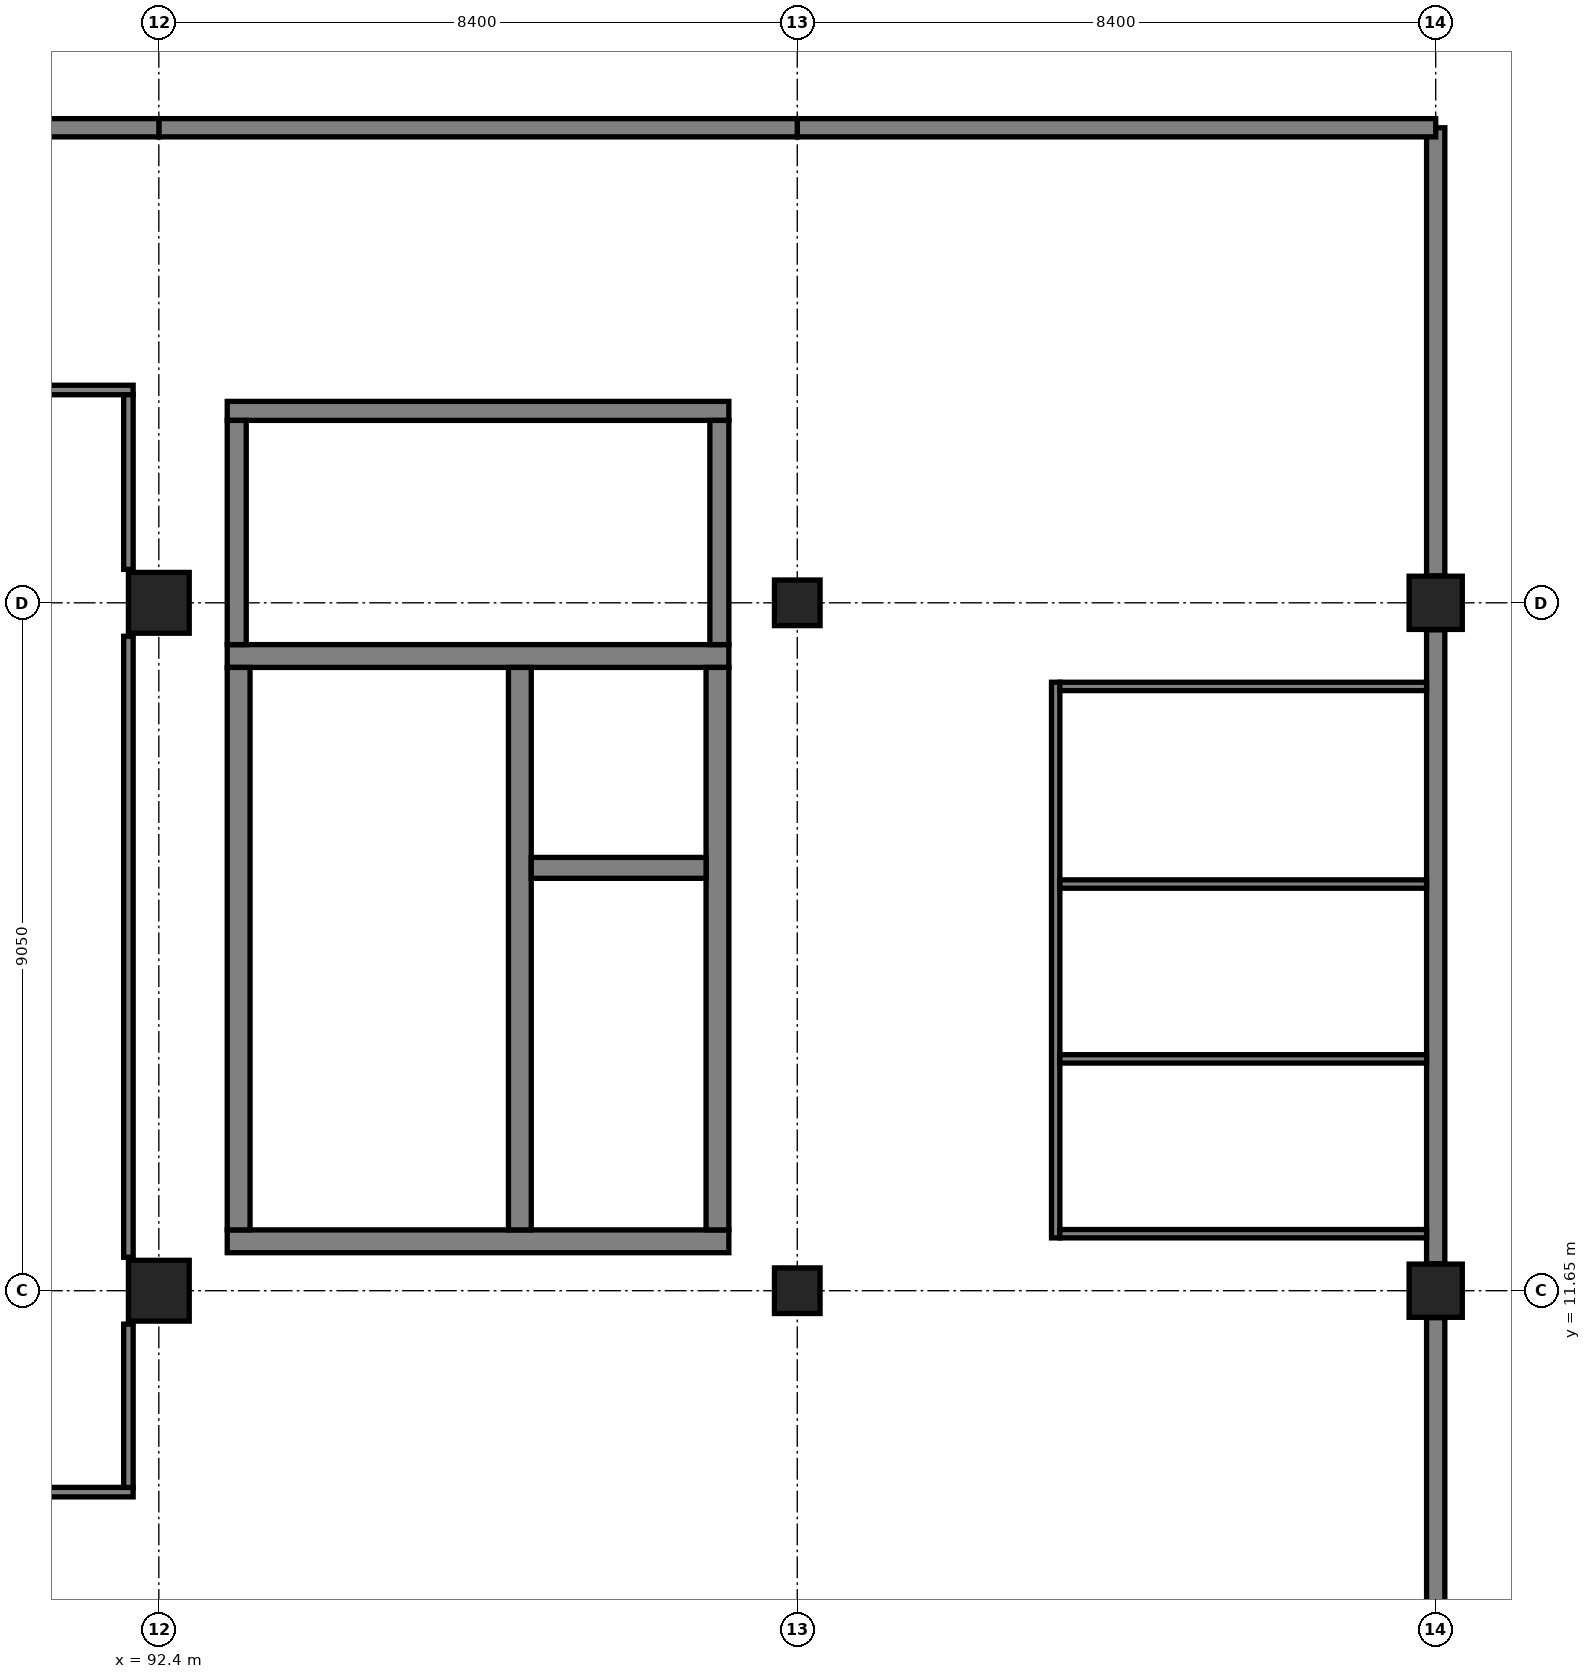
"""IFC4 building model, lengths in metres.
Left out: names, types, materials, properties, quantities, classifications, styles, units other than length and angle.
Written with IfcOpenShell. Run it as: python <this file> out.ifc"""

import sys

from ifc_helpers import new_model, si_unit, direction, frame, frame_2d, origin, origin_2d, place, context, subcontext, project, spatial, rectangle, extrude, element, fill, save


model = new_model("IFC4")
c1 = context("Model", 3, precision=1e-05, world=origin(), true_north=direction((0.0, 1.0)))
c2 = subcontext(c1, "Body", "Model", "MODEL_VIEW")
j1 = project(units=[si_unit("LENGTHUNIT", "METRE"), si_unit("PLANEANGLEUNIT", "RADIAN")], contexts=[c1])
p1 = place(None, origin())
s1 = spatial("IfcSite", under=j1, at=p1, CompositionType="ELEMENT")
p2 = place(p1, origin())
s2 = spatial("IfcBuilding", under=s1, at=p2, CompositionType="ELEMENT")
p3 = place(p2, frame((0.0, 0.0, 15.6)))
s3 = spatial("IfcBuildingStorey", under=s2, at=p3, CompositionType="ELEMENT", Elevation=15.6)
for number, where, z_axis, x_axis in (
    (1, (92.4, 11.65, 0.0), (0.0, 0.0, 1.0), (1.0, 0.0, 0.0)),
    (2, (92.4, 20.7, 0.0), (0.0, 0.0, 1.0), (1.0, 0.0, 0.0)),
):
    element("IfcColumn", number, at=place(p3, frame(where, z_axis=z_axis, x_axis=x_axis)), inside=s3, PredefinedType="COLUMN", context=c2, shape_type="SweptSolid", body=[
        extrude(rectangle(XDim=0.8, YDim=0.8, at=origin_2d()), origin(), (0.0, 0.0, 1.0), 4.5),
    ])
for number, where, z_axis, x_axis in (
    (3, (100.8, 11.65, 0.0), (0.0, 0.0, 1.0), (1.0, 0.0, 0.0)),
    (4, (100.8, 20.7, 0.0), (0.0, 0.0, 1.0), (1.0, 0.0, 0.0)),
):
    element("IfcColumn", number, at=place(p3, frame(where, z_axis=z_axis, x_axis=x_axis)), inside=s3, PredefinedType="COLUMN", context=c2, shape_type="SweptSolid", body=[
        extrude(rectangle(XDim=0.6, YDim=0.6, at=origin_2d()), origin(), (0.0, 0.0, 1.0), 4.5),
    ])
for number, where, z_axis, x_axis in (
    (5, (109.2, 11.65, 0.0), (0.0, 0.0, 1.0), (1.0, 0.0, 0.0)),
    (6, (109.2, 20.7, 0.0), (0.0, 0.0, 1.0), (1.0, 0.0, 0.0)),
):
    element("IfcColumn", number, at=place(p3, frame(where, z_axis=z_axis, x_axis=x_axis)), inside=s3, PredefinedType="COLUMN", context=c2, shape_type="SweptSolid", body=[
        extrude(rectangle(XDim=0.7, YDim=0.7, at=origin_2d()), origin(), (0.0, 0.0, 1.0), 4.5),
    ])
p4 = place(p3, frame((109.2, 2.905, 0.0), z_axis=(0.0, 0.0, 1.0), x_axis=(0.0, 1.0, 0.0)))
e7 = element("IfcWall", 7, at=p4, inside=s3, PredefinedType="STANDARD", context=c2, shape_type="SweptSolid", body=[
    extrude(rectangle(XDim=8.39, YDim=0.24, at=frame_2d((4.195, 0.0))), origin(), (0.0, 0.0, 1.0), 3.35),
])
p5 = place(p4, frame((3.355, 0.0, 0.95)))
e8 = element("IfcOpeningElement", 8, at=p5, cuts=e7, PredefinedType="OPENING", context=c2, shape_type="SweptSolid", body=[
    extrude(rectangle(XDim=1.68, YDim=2.08, at=frame_2d((0.84, 1.04))), frame((0.0, 0.13, 0.0), z_axis=(0.0, -1.0, 0.0), x_axis=(1.0, 0.0, 0.0)), (0.0, 0.0, 1.0), 0.26),
])
p6 = place(p3, frame((109.2, 12.005, 0.0), z_axis=(0.0, 0.0, 1.0), x_axis=(0.0, 1.0, 0.0)))
e9 = element("IfcWall", 9, at=p6, inside=s3, PredefinedType="STANDARD", context=c2, shape_type="SweptSolid", body=[
    extrude(rectangle(XDim=8.34, YDim=0.24, at=frame_2d((4.17, 0.0))), origin(), (0.0, 0.0, 1.0), 3.35),
])
p7 = place(p3, frame((109.2, 21.055, 0.0), z_axis=(0.0, 0.0, 1.0), x_axis=(0.0, 1.0, 0.0)))
e10 = element("IfcWall", 10, at=p7, inside=s3, PredefinedType="STANDARD", context=c2, shape_type="SweptSolid", body=[
    extrude(rectangle(XDim=5.895, YDim=0.24, at=frame_2d((2.948, 0.0))), origin(), (0.0, 0.0, 1.0), 4.2),
])
p8 = place(p7, frame((1.717, 0.0, 0.95)))
e11 = element("IfcOpeningElement", 11, at=p8, cuts=e10, PredefinedType="OPENING", context=c2, shape_type="SweptSolid", body=[
    extrude(rectangle(XDim=2.46, YDim=2.14, at=frame_2d((1.23, 1.07))), frame((0.0, 0.13, 0.0), z_axis=(0.0, -1.0, 0.0), x_axis=(1.0, 0.0, 0.0)), (0.0, 0.0, 1.0), 0.26),
])
p9 = place(p3, frame((109.2, 26.95, 0.0), z_axis=(0.0, 0.0, 1.0), x_axis=(-1.0, 0.0, 0.0)))
e12 = element("IfcWall", 12, at=p9, inside=s3, PredefinedType="STANDARD", context=c2, shape_type="SweptSolid", body=[
    extrude(rectangle(XDim=8.4, YDim=0.24, at=frame_2d((4.2, 0.0))), origin(), (0.0, 0.0, 1.0), 4.2),
])
p10 = place(p9, frame((3.07, 0.0, 0.95)))
e13 = element("IfcOpeningElement", 13, at=p10, cuts=e12, PredefinedType="OPENING", context=c2, shape_type="SweptSolid", body=[
    extrude(rectangle(XDim=2.26, YDim=2.02, at=frame_2d((1.13, 1.01))), frame((0.0, 0.13, 0.0), z_axis=(0.0, -1.0, 0.0), x_axis=(1.0, 0.0, 0.0)), (0.0, 0.0, 1.0), 0.26),
])
p11 = place(p3, frame((100.8, 26.95, 0.0), z_axis=(0.0, 0.0, 1.0), x_axis=(-1.0, 0.0, 0.0)))
e14 = element("IfcWall", 14, at=p11, inside=s3, PredefinedType="STANDARD", context=c2, shape_type="SweptSolid", body=[
    extrude(rectangle(XDim=8.4, YDim=0.24, at=frame_2d((4.2, 0.0))), origin(), (0.0, 0.0, 1.0), 4.2),
])
p12 = place(p11, frame((3.4, 0.0, 0.0)))
e15 = element("IfcOpeningElement", 15, at=p12, cuts=e14, PredefinedType="OPENING", context=c2, shape_type="SweptSolid", body=[
    extrude(rectangle(XDim=1.6, YDim=2.25, at=frame_2d((0.8, 1.125))), frame((0.0, 0.13, 0.0), z_axis=(0.0, -1.0, 0.0), x_axis=(1.0, 0.0, 0.0)), (0.0, 0.0, 1.0), 0.26),
])
p13 = place(p3, frame((92.4, 26.95, 0.0), z_axis=(0.0, 0.0, 1.0), x_axis=(-1.0, 0.0, 0.0)))
e16 = element("IfcWall", 16, at=p13, inside=s3, PredefinedType="STANDARD", context=c2, shape_type="SweptSolid", body=[
    extrude(rectangle(XDim=8.4, YDim=0.24, at=frame_2d((4.2, 0.0))), origin(), (0.0, 0.0, 1.0), 4.2),
])
p14 = place(p13, frame((3.4, 0.0, 0.0)))
e17 = element("IfcOpeningElement", 17, at=p14, cuts=e16, PredefinedType="OPENING", context=c2, shape_type="SweptSolid", body=[
    extrude(rectangle(XDim=1.6, YDim=2.25, at=frame_2d((0.8, 1.125))), frame((0.0, 0.13, 0.0), z_axis=(0.0, -1.0, 0.0), x_axis=(1.0, 0.0, 0.0)), (0.0, 0.0, 1.0), 0.26),
])
p15 = place(p3, frame((93.3, 12.3, 0.0), z_axis=(0.0, 0.0, 1.0), x_axis=(1.0, 0.0, 0.0)))
e18 = element("IfcWall", 18, at=p15, inside=s3, PredefinedType="SHEAR", context=c2, shape_type="SweptSolid", body=[
    extrude(rectangle(XDim=6.6, YDim=0.3, at=frame_2d((3.3, 0.0))), origin(), (0.0, 0.0, 1.0), 4.2),
])
p16 = place(p3, frame((93.3, 20.0, 0.0), z_axis=(0.0, 0.0, 1.0), x_axis=(1.0, 0.0, 0.0)))
e19 = element("IfcWall", 19, at=p16, inside=s3, PredefinedType="SHEAR", context=c2, shape_type="SweptSolid", body=[
    extrude(rectangle(XDim=6.6, YDim=0.3, at=frame_2d((3.3, 0.0))), origin(), (0.0, 0.0, 1.0), 4.2),
])
p17 = place(p16, frame((1.425, 0.0, 0.0)))
e20 = element("IfcOpeningElement", 20, at=p17, cuts=e19, PredefinedType="OPENING", context=c2, shape_type="SweptSolid", body=[
    extrude(rectangle(XDim=1.15, YDim=2.2, at=frame_2d((0.575, 1.1))), frame((0.0, 0.16, 0.0), z_axis=(0.0, -1.0, 0.0), x_axis=(1.0, 0.0, 0.0)), (0.0, 0.0, 1.0), 0.32),
])
p18 = place(p16, frame((4.55, 0.0, 0.0)))
e21 = element("IfcOpeningElement", 21, at=p18, cuts=e19, PredefinedType="OPENING", context=c2, shape_type="SweptSolid", body=[
    extrude(rectangle(XDim=1.2, YDim=2.15, at=frame_2d((0.6, 1.075))), frame((0.0, 0.16, 0.0), z_axis=(0.0, -1.0, 0.0), x_axis=(1.0, 0.0, 0.0)), (0.0, 0.0, 1.0), 0.32),
])
for number, where, z_axis, x_axis in (
    (22, (93.45, 12.45, 0.0), (0.0, 0.0, 1.0), (0.0, 1.0, 0.0)),
    (23, (99.75, 12.45, 0.0), (0.0, 0.0, 1.0), (0.0, 1.0, 0.0)),
    (24, (97.15, 12.45, 0.0), (0.0, 0.0, 1.0), (0.0, 1.0, 0.0)),
):
    element("IfcWall", number, at=place(p3, frame(where, z_axis=z_axis, x_axis=x_axis)), inside=s3, PredefinedType="SHEAR", context=c2, shape_type="SweptSolid", body=[
        extrude(rectangle(XDim=7.4, YDim=0.3, at=frame_2d((3.7, 0.0))), origin(), (0.0, 0.0, 1.0), 4.2),
    ])
p19 = place(p3, frame((97.3, 17.213, 0.0), z_axis=(0.0, 0.0, 1.0), x_axis=(1.0, 0.0, 0.0)))
e25 = element("IfcWall", 25, at=p19, inside=s3, PredefinedType="SHEAR", context=c2, shape_type="SweptSolid", body=[
    extrude(rectangle(XDim=2.3, YDim=0.275, at=frame_2d((1.15, 0.0))), origin(), (0.0, 0.0, 1.0), 4.2),
])
p20 = place(p3, frame((93.3, 23.225, 0.0), z_axis=(0.0, 0.0, 1.0), x_axis=(1.0, 0.0, 0.0)))
e26 = element("IfcWall", 26, at=p20, inside=s3, PredefinedType="PARTITIONING", context=c2, shape_type="SweptSolid", body=[
    extrude(rectangle(XDim=6.6, YDim=0.25, at=frame_2d((3.3, 0.0))), origin(), (0.0, 0.0, 1.0), 4.2),
])
p21 = place(p20, frame((2.4, 0.0, 0.0)))
e27 = element("IfcOpeningElement", 27, at=p21, cuts=e26, PredefinedType="OPENING", context=c2, shape_type="SweptSolid", body=[
    extrude(rectangle(XDim=1.8, YDim=2.25, at=frame_2d((0.9, 1.125))), frame((0.0, 0.135, 0.0), z_axis=(0.0, -1.0, 0.0), x_axis=(1.0, 0.0, 0.0)), (0.0, 0.0, 1.0), 0.27),
])
for number, where, z_axis, x_axis in (
    (28, (93.425, 20.15, 0.0), (0.0, 0.0, 1.0), (0.0, 1.0, 0.0)),
    (29, (99.775, 20.15, 0.0), (0.0, 0.0, 1.0), (0.0, 1.0, 0.0)),
):
    element("IfcWall", number, at=place(p3, frame(where, z_axis=z_axis, x_axis=x_axis)), inside=s3, PredefinedType="PARTITIONING", context=c2, shape_type="SweptSolid", body=[
        extrude(rectangle(XDim=2.95, YDim=0.25, at=frame_2d((1.475, 0.0))), origin(), (0.0, 0.0, 1.0), 3.43),
    ])
p22 = place(p3, frame((104.2, 12.345, 0.0), z_axis=(0.0, 0.0, 1.0), x_axis=(0.0, 1.0, 0.0)))
e30 = element("IfcWall", 30, at=p22, inside=s3, PredefinedType="PARTITIONING", context=c2, shape_type="SweptSolid", body=[
    extrude(rectangle(XDim=7.31, YDim=0.11, at=frame_2d((3.655, 0.0))), origin(), (0.0, 0.0, 1.0), 3.35),
])
p23 = place(p22, frame((0.745, 0.0, 0.0)))
e31 = element("IfcOpeningElement", 31, at=p23, cuts=e30, PredefinedType="OPENING", context=c2, shape_type="SweptSolid", body=[
    extrude(rectangle(XDim=0.92, YDim=2.1, at=frame_2d((0.46, 1.05))), frame((0.0, 0.065, 0.0), z_axis=(0.0, -1.0, 0.0), x_axis=(1.0, 0.0, 0.0)), (0.0, 0.0, 1.0), 0.13),
])
p24 = place(p22, frame((3.045, 0.0, 0.0)))
e32 = element("IfcOpeningElement", 32, at=p24, cuts=e30, PredefinedType="OPENING", context=c2, shape_type="SweptSolid", body=[
    extrude(rectangle(XDim=0.92, YDim=2.1, at=frame_2d((0.46, 1.05))), frame((0.0, 0.065, 0.0), z_axis=(0.0, -1.0, 0.0), x_axis=(1.0, 0.0, 0.0)), (0.0, 0.0, 1.0), 0.13),
])
p25 = place(p22, frame((5.455, 0.0, 0.0)))
e33 = element("IfcOpeningElement", 33, at=p25, cuts=e30, PredefinedType="OPENING", context=c2, shape_type="SweptSolid", body=[
    extrude(rectangle(XDim=1.0, YDim=2.15, at=frame_2d((0.5, 1.075))), frame((0.0, 0.065, 0.0), z_axis=(0.0, -1.0, 0.0), x_axis=(1.0, 0.0, 0.0)), (0.0, 0.0, 1.0), 0.13),
])
for number, where, z_axis, x_axis in (
    (34, (104.255, 12.4, 0.0), (0.0, 0.0, 1.0), (1.0, 0.0, 0.0)),
    (35, (104.255, 14.7, 0.0), (0.0, 0.0, 1.0), (1.0, 0.0, 0.0)),
    (36, (104.255, 17.0, 0.0), (0.0, 0.0, 1.0), (1.0, 0.0, 0.0)),
    (37, (104.255, 19.6, 0.0), (0.0, 0.0, 1.0), (1.0, 0.0, 0.0)),
):
    element("IfcWall", number, at=place(p3, frame(where, z_axis=z_axis, x_axis=x_axis)), inside=s3, PredefinedType="PARTITIONING", context=c2, shape_type="SweptSolid", body=[
        extrude(rectangle(XDim=4.825, YDim=0.11, at=frame_2d((2.413, 0.0))), origin(), (0.0, 0.0, 1.0), 3.35),
    ])
p26 = place(p3, frame((67.537, 9.0, 0.0), z_axis=(0.0, 0.0, 1.0), x_axis=(1.0, 0.0, 0.0)))
e38 = element("IfcWall", 38, at=p26, inside=s3, PredefinedType="PARTITIONING", context=c2, shape_type="SweptSolid", body=[
    extrude(rectangle(XDim=24.525, YDim=0.125, at=frame_2d((12.262, 0.0))), origin(), (0.0, 0.0, 1.0), 3.45),
])
p27 = place(p26, frame((11.482, 0.0, 0.0)))
e39 = element("IfcOpeningElement", 39, at=p27, cuts=e38, PredefinedType="OPENING", context=c2, shape_type="SweptSolid", body=[
    extrude(rectangle(XDim=1.56, YDim=2.32, at=frame_2d((0.78, 1.16))), frame((0.0, 0.073, 0.0), z_axis=(0.0, -1.0, 0.0), x_axis=(1.0, 0.0, 0.0)), (0.0, 0.0, 1.0), 0.145),
])
p28 = place(p26, frame((13.642, 0.0, 1.05)))
e40 = element("IfcOpeningElement", 40, at=p28, cuts=e38, PredefinedType="OPENING", context=c2, shape_type="SweptSolid", body=[
    extrude(rectangle(XDim=1.8, YDim=1.25, at=frame_2d((0.9, 0.625))), frame((0.0, 0.073, 0.0), z_axis=(0.0, -1.0, 0.0), x_axis=(1.0, 0.0, 0.0)), (0.0, 0.0, 1.0), 0.145),
])
p29 = place(p3, frame((67.537, 23.5, 0.0), z_axis=(0.0, 0.0, 1.0), x_axis=(1.0, 0.0, 0.0)))
e41 = element("IfcWall", 41, at=p29, inside=s3, PredefinedType="PARTITIONING", context=c2, shape_type="SweptSolid", body=[
    extrude(rectangle(XDim=24.525, YDim=0.125, at=frame_2d((12.262, 0.0))), origin(), (0.0, 0.0, 1.0), 3.43),
])
p30 = place(p3, frame((92.0, 9.062, 0.0), z_axis=(0.0, 0.0, 1.0), x_axis=(0.0, 1.0, 0.0)))
e42 = element("IfcWall", 42, at=p30, inside=s3, PredefinedType="PARTITIONING", context=c2, shape_type="SweptSolid", body=[
    extrude(rectangle(XDim=2.148, YDim=0.125, at=frame_2d((1.074, 0.0))), origin(), (0.0, 0.0, 1.0), 4.2),
])
p31 = place(p3, frame((92.0, 12.09, 0.0), z_axis=(0.0, 0.0, 1.0), x_axis=(0.0, 1.0, 0.0)))
e43 = element("IfcWall", 43, at=p31, inside=s3, PredefinedType="PARTITIONING", context=c2, shape_type="SweptSolid", body=[
    extrude(rectangle(XDim=8.17, YDim=0.125, at=frame_2d((4.085, 0.0))), origin(), (0.0, 0.0, 1.0), 3.84),
])
p32 = place(p3, frame((92.0, 21.14, 0.0), z_axis=(0.0, 0.0, 1.0), x_axis=(0.0, 1.0, 0.0)))
e44 = element("IfcWall", 44, at=p32, inside=s3, PredefinedType="PARTITIONING", context=c2, shape_type="SweptSolid", body=[
    extrude(rectangle(XDim=2.298, YDim=0.125, at=frame_2d((1.149, 0.0))), origin(), (0.0, 0.0, 1.0), 4.2),
])
p33 = place(p5, origin())
e45 = element("IfcWindow", 45, at=p33, inside=s3, PartitioningType="SINGLE_PANEL", PredefinedType="WINDOW", context=c2, shape_type="SweptSolid", body=[
    extrude(rectangle(XDim=1.68, YDim=2.08, at=frame_2d((0.84, 1.04))), frame((0.0, 0.03, 0.0), z_axis=(0.0, -1.0, 0.0), x_axis=(1.0, 0.0, 0.0)), (0.0, 0.0, 1.0), 0.06),
])
fill(e8, e45)
p34 = place(p8, origin())
e46 = element("IfcWindow", 46, at=p34, inside=s3, PartitioningType="SINGLE_PANEL", PredefinedType="WINDOW", context=c2, shape_type="SweptSolid", body=[
    extrude(rectangle(XDim=2.46, YDim=2.14, at=frame_2d((1.23, 1.07))), frame((0.0, 0.03, 0.0), z_axis=(0.0, -1.0, 0.0), x_axis=(1.0, 0.0, 0.0)), (0.0, 0.0, 1.0), 0.06),
])
fill(e11, e46)
p35 = place(p10, origin())
e47 = element("IfcWindow", 47, at=p35, inside=s3, PartitioningType="SINGLE_PANEL", PredefinedType="WINDOW", context=c2, shape_type="SweptSolid", body=[
    extrude(rectangle(XDim=2.26, YDim=2.02, at=frame_2d((1.13, 1.01))), frame((0.0, 0.03, 0.0), z_axis=(0.0, -1.0, 0.0), x_axis=(1.0, 0.0, 0.0)), (0.0, 0.0, 1.0), 0.06),
])
fill(e13, e47)
p36 = place(p12, frame((1.6, 0.0, 0.0), z_axis=(0.0, 0.0, 1.0), x_axis=(-1.0, 0.0, 0.0)))
e48 = element("IfcDoor", 48, at=p36, inside=s3, OperationType="DOUBLE_DOOR_SINGLE_SWING", PredefinedType="DOOR", context=c2, shape_type="SweptSolid", body=[
    extrude(rectangle(XDim=1.6, YDim=2.25, at=frame_2d((0.8, 1.125))), frame((0.0, 0.025, 0.0), z_axis=(0.0, -1.0, 0.0), x_axis=(1.0, 0.0, 0.0)), (0.0, 0.0, 1.0), 0.05),
])
fill(e15, e48)
p37 = place(p17, frame((1.15, 0.0, 0.0), z_axis=(0.0, 0.0, 1.0), x_axis=(-1.0, 0.0, 0.0)))
e49 = element("IfcDoor", 49, at=p37, inside=s3, OperationType="SINGLE_SWING_LEFT", PredefinedType="DOOR", context=c2, shape_type="SweptSolid", body=[
    extrude(rectangle(XDim=1.15, YDim=2.2, at=frame_2d((0.575, 1.1))), frame((0.0, 0.025, 0.0), z_axis=(0.0, -1.0, 0.0), x_axis=(1.0, 0.0, 0.0)), (0.0, 0.0, 1.0), 0.05),
])
fill(e20, e49)
p38 = place(p18, origin())
e50 = element("IfcDoor", 50, at=p38, inside=s3, OperationType="DOUBLE_DOOR_SLIDING", PredefinedType="DOOR", context=c2, shape_type="SweptSolid", body=[
    extrude(rectangle(XDim=1.2, YDim=2.15, at=frame_2d((0.6, 1.075))), frame((0.0, 0.025, 0.0), z_axis=(0.0, -1.0, 0.0), x_axis=(1.0, 0.0, 0.0)), (0.0, 0.0, 1.0), 0.05),
])
fill(e21, e50)
p39 = place(p21, origin())
e51 = element("IfcDoor", 51, at=p39, inside=s3, OperationType="DOUBLE_DOOR_SINGLE_SWING", PredefinedType="DOOR", context=c2, shape_type="SweptSolid", body=[
    extrude(rectangle(XDim=1.8, YDim=2.25, at=frame_2d((0.9, 1.125))), frame((0.0, 0.025, 0.0), z_axis=(0.0, -1.0, 0.0), x_axis=(1.0, 0.0, 0.0)), (0.0, 0.0, 1.0), 0.05),
])
fill(e27, e51)
p40 = place(p23, origin())
e52 = element("IfcDoor", 52, at=p40, inside=s3, OperationType="SINGLE_SWING_LEFT", PredefinedType="DOOR", context=c2, shape_type="SweptSolid", body=[
    extrude(rectangle(XDim=0.92, YDim=2.1, at=frame_2d((0.46, 1.05))), frame((0.0, 0.025, 0.0), z_axis=(0.0, -1.0, 0.0), x_axis=(1.0, 0.0, 0.0)), (0.0, 0.0, 1.0), 0.05),
])
fill(e31, e52)
p41 = place(p24, origin())
e53 = element("IfcDoor", 53, at=p41, inside=s3, OperationType="SINGLE_SWING_RIGHT", PredefinedType="DOOR", context=c2, shape_type="SweptSolid", body=[
    extrude(rectangle(XDim=0.92, YDim=2.1, at=frame_2d((0.46, 1.05))), frame((0.0, 0.025, 0.0), z_axis=(0.0, -1.0, 0.0), x_axis=(1.0, 0.0, 0.0)), (0.0, 0.0, 1.0), 0.05),
])
fill(e32, e53)
p42 = place(p25, origin())
e54 = element("IfcDoor", 54, at=p42, inside=s3, OperationType="SINGLE_SWING_LEFT", PredefinedType="DOOR", context=c2, shape_type="SweptSolid", body=[
    extrude(rectangle(XDim=1.0, YDim=2.15, at=frame_2d((0.5, 1.075))), frame((0.0, 0.025, 0.0), z_axis=(0.0, -1.0, 0.0), x_axis=(1.0, 0.0, 0.0)), (0.0, 0.0, 1.0), 0.05),
])
fill(e33, e54)
save(model, sys.argv[1])
